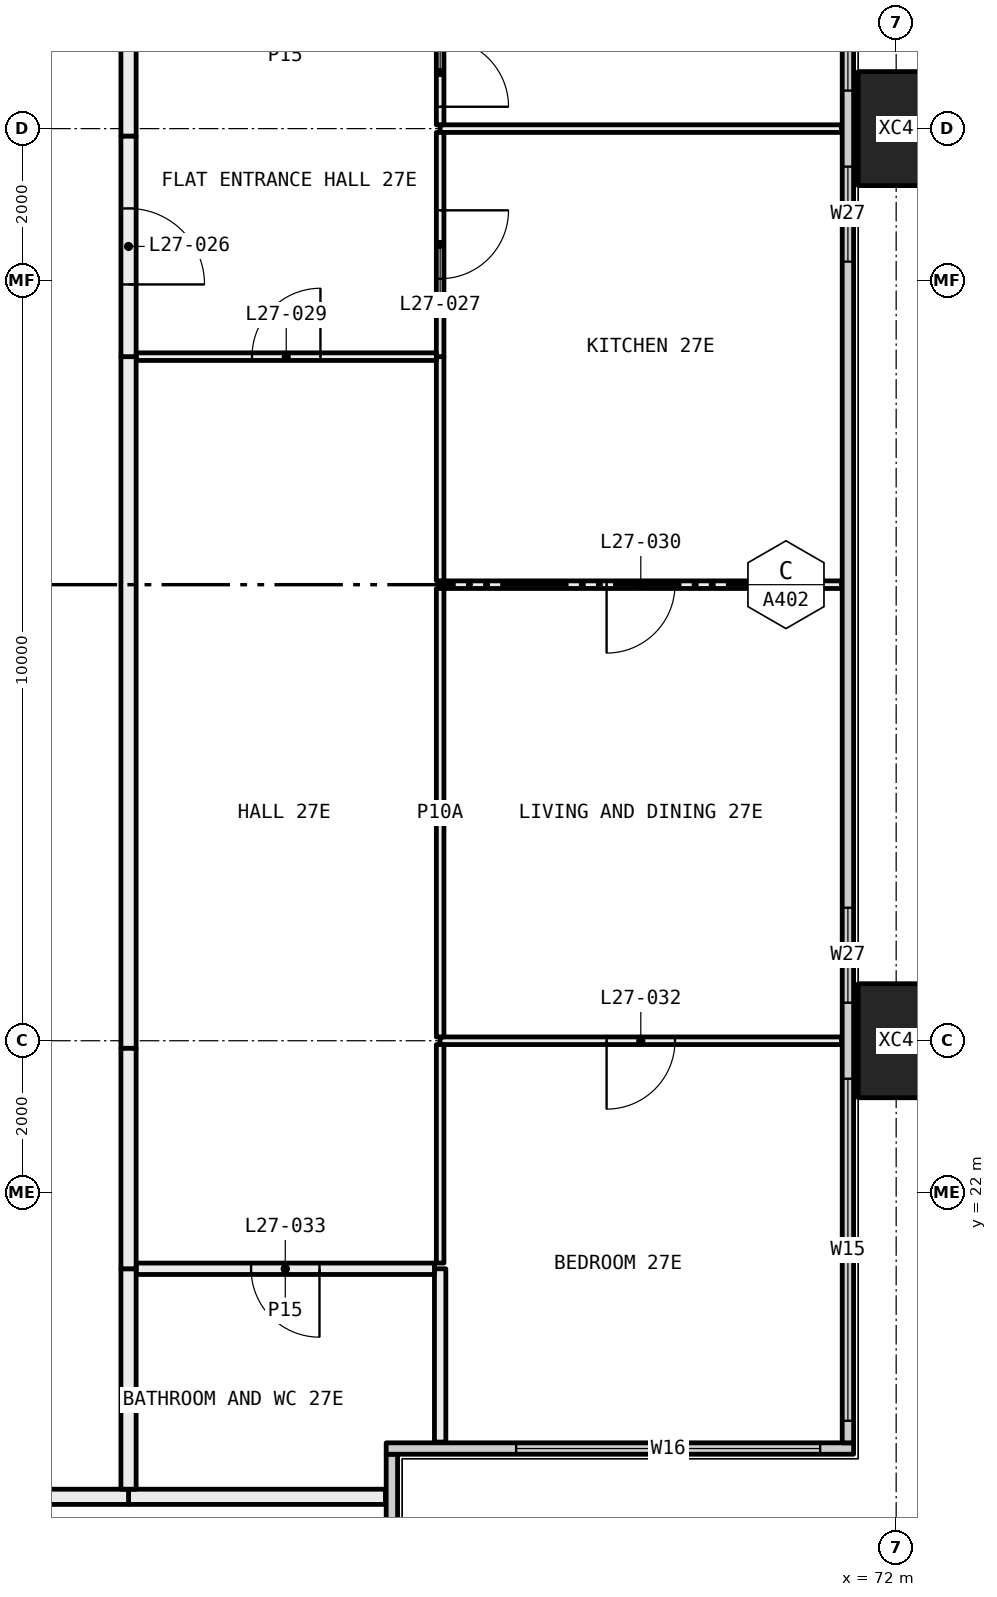
"""IFC4 building model, lengths in metres.
Left out: names, types, materials, properties, quantities, classifications, styles, units other than length and angle.
Written with IfcOpenShell. Run it as: python <this file> out.ifc"""

import sys

from ifc_helpers import new_model, si_unit, direction, frame, frame_2d, origin, origin_2d, place, context, subcontext, project, spatial, rectangle, hollow_rectangle, extrude, element, fill, save


model = new_model("IFC4")
c1 = context("Model", 3, precision=1e-05, world=origin(), true_north=direction((0.0, 1.0)))
c2 = subcontext(c1, "Body", "Model", "MODEL_VIEW")
j1 = project(units=[si_unit("LENGTHUNIT", "METRE"), si_unit("PLANEANGLEUNIT", "RADIAN")], contexts=[c1])
p1 = place(None, origin())
s1 = spatial("IfcSite", under=j1, at=p1, CompositionType="ELEMENT")
p2 = place(p1, origin())
s2 = spatial("IfcBuilding", under=s1, at=p2, CompositionType="ELEMENT")
p3 = place(p2, frame((0.0, 0.0, 106.95)))
s3 = spatial("IfcBuildingStorey", under=s2, at=p3, CompositionType="ELEMENT", Elevation=106.95)
for number, where, z_axis, x_axis in (
    (1, (72.0, 24.0, -0.4), (0.0, 0.0, 1.0), (0.0, 1.0, 0.0)),
    (2, (72.0, 36.0, -0.4), (0.0, 0.0, 1.0), (0.0, 1.0, 0.0)),
):
    element("IfcColumn", number, at=place(p3, frame(where, z_axis=z_axis, x_axis=x_axis)), inside=s3, PredefinedType="COLUMN", context=c2, shape_type="SweptSolid", body=[
        extrude(hollow_rectangle(XDim=1.5, YDim=1.0, WallThickness=0.06, at=origin_2d()), origin(), (0.0, 0.0, 1.0), 3.45),
    ])
p4 = place(p3, frame((65.365, 12.71, 0.0), z_axis=(0.0, 0.0, 1.0), x_axis=(0.0, 1.0, 0.0)))
e3 = element("IfcWall", 3, at=p4, inside=s3, PredefinedType="ELEMENTEDWALL", context=c2, shape_type="SweptSolid", body=[
    extrude(rectangle(XDim=5.85, YDim=0.15, at=frame_2d((2.925, 0.0))), origin(), (0.0, 0.0, 1.0), 3.05),
])
p5 = place(p4, frame((0.29, 0.0, 0.45)))
e4 = element("IfcOpeningElement", 4, at=p5, cuts=e3, PredefinedType="OPENING", context=c2, shape_type="SweptSolid", body=[
    extrude(rectangle(XDim=4.0, YDim=2.55, at=frame_2d((2.0, 1.275))), frame((0.0, 0.085, 0.0), z_axis=(0.0, -1.0, 0.0), x_axis=(1.0, 0.0, 0.0)), (0.0, 0.0, 1.0), 0.17),
])
p6 = place(p3, frame((65.29, 18.635, 0.0), z_axis=(0.0, 0.0, 1.0), x_axis=(1.0, 0.0, 0.0)))
e5 = element("IfcWall", 5, at=p6, inside=s3, PredefinedType="ELEMENTEDWALL", context=c2, shape_type="SweptSolid", body=[
    extrude(rectangle(XDim=6.15, YDim=0.15, at=frame_2d((3.075, 0.0))), origin(), (0.0, 0.0, 1.0), 3.05),
])
p7 = place(p6, frame((1.71, 0.0, 0.45)))
e6 = element("IfcOpeningElement", 6, at=p7, cuts=e5, PredefinedType="OPENING", context=c2, shape_type="SweptSolid", body=[
    extrude(rectangle(XDim=4.0, YDim=2.55, at=frame_2d((2.0, 1.275))), frame((0.0, 0.085, 0.0), z_axis=(0.0, -1.0, 0.0), x_axis=(1.0, 0.0, 0.0)), (0.0, 0.0, 1.0), 0.17),
])
p8 = place(p3, frame((71.365, 18.71, 0.0), z_axis=(0.0, 0.0, 1.0), x_axis=(0.0, 1.0, 0.0)))
e7 = element("IfcWall", 7, at=p8, inside=s3, PredefinedType="ELEMENTEDWALL", context=c2, shape_type="SweptSolid", body=[
    extrude(rectangle(XDim=22.58, YDim=0.15, at=frame_2d((11.29, 0.0))), origin(), (0.0, 0.0, 1.0), 3.05),
])
p9 = place(p8, frame((0.29, 0.0, 0.45)))
e8 = element("IfcOpeningElement", 8, at=p9, cuts=e7, PredefinedType="OPENING", context=c2, shape_type="SweptSolid", body=[
    extrude(rectangle(XDim=4.5, YDim=2.55, at=frame_2d((2.25, 1.275))), frame((0.0, 0.085, 0.0), z_axis=(0.0, -1.0, 0.0), x_axis=(1.0, 0.0, 0.0)), (0.0, 0.0, 1.0), 0.17),
])
p10 = place(p8, frame((5.79, 0.0, 0.45)))
e9 = element("IfcOpeningElement", 9, at=p10, cuts=e7, PredefinedType="OPENING", context=c2, shape_type="SweptSolid", body=[
    extrude(rectangle(XDim=1.25, YDim=2.55, at=frame_2d((0.625, 1.275))), frame((0.0, 0.085, 0.0), z_axis=(0.0, -1.0, 0.0), x_axis=(1.0, 0.0, 0.0)), (0.0, 0.0, 1.0), 0.17),
])
p11 = place(p8, frame((15.54, 0.0, 0.45)))
e10 = element("IfcOpeningElement", 10, at=p11, cuts=e7, PredefinedType="OPENING", context=c2, shape_type="SweptSolid", body=[
    extrude(rectangle(XDim=1.25, YDim=2.55, at=frame_2d((0.625, 1.275))), frame((0.0, 0.085, 0.0), z_axis=(0.0, -1.0, 0.0), x_axis=(1.0, 0.0, 0.0)), (0.0, 0.0, 1.0), 0.17),
])
p12 = place(p8, frame((17.79, 0.0, 0.45)))
e11 = element("IfcOpeningElement", 11, at=p12, cuts=e7, PredefinedType="OPENING", context=c2, shape_type="SweptSolid", body=[
    extrude(rectangle(XDim=4.5, YDim=2.55, at=frame_2d((2.25, 1.275))), frame((0.0, 0.085, 0.0), z_axis=(0.0, -1.0, 0.0), x_axis=(1.0, 0.0, 0.0)), (0.0, 0.0, 1.0), 0.17),
])
p13 = place(p3, frame((65.28, 18.0, 0.0), z_axis=(0.0, 0.0, 1.0), x_axis=(-1.0, 0.0, 0.0)))
e12 = element("IfcWall", 12, at=p13, inside=s3, PredefinedType="PARTITIONING", context=c2, shape_type="SweptSolid", body=[
    extrude(rectangle(XDim=3.38, YDim=0.2, at=frame_2d((1.69, 0.0))), origin(), (0.0, 0.0, 1.0), 3.05),
])
p14 = place(p3, frame((61.9, 18.0, 0.0), z_axis=(0.0, 0.0, 1.0), x_axis=(-1.0, 0.0, 0.0)))
e13 = element("IfcWall", 13, at=p14, inside=s3, PredefinedType="PARTITIONING", context=c2, shape_type="SweptSolid", body=[
    extrude(rectangle(XDim=1.9, YDim=0.2, at=frame_2d((0.95, 0.0))), origin(), (0.0, 0.0, 1.0), 3.05),
])
p15 = place(p3, frame((71.28, 24.0, 0.0), z_axis=(0.0, 0.0, 1.0), x_axis=(-1.0, 0.0, 0.0)))
e14 = element("IfcWall", 14, at=p15, inside=s3, PredefinedType="PARTITIONING", context=c2, shape_type="SweptSolid", body=[
    extrude(rectangle(XDim=5.28, YDim=0.1, at=frame_2d((2.64, 0.0))), origin(), (0.0, 0.0, 1.0), 2.45),
])
p16 = place(p15, frame((2.19, 0.0, 0.0)))
e15 = element("IfcOpeningElement", 15, at=p16, cuts=e14, PredefinedType="OPENING", context=c2, shape_type="SweptSolid", body=[
    extrude(rectangle(XDim=0.9, YDim=2.1, at=frame_2d((0.45, 1.05))), frame((0.0, 0.06, 0.0), z_axis=(0.0, -1.0, 0.0), x_axis=(1.0, 0.0, 0.0)), (0.0, 0.0, 1.0), 0.12),
])
p17 = place(p3, frame((66.0, 21.0, 0.0), z_axis=(0.0, 0.0, 1.0), x_axis=(0.0, -1.0, 0.0)))
e16 = element("IfcWall", 16, at=p17, inside=s3, PredefinedType="PARTITIONING", context=c2, shape_type="SweptSolid", body=[
    extrude(rectangle(XDim=2.28, YDim=0.15, at=frame_2d((1.14, 0.0))), origin(), (0.0, 0.0, 1.0), 3.05),
])
p18 = place(p3, frame((66.0, 23.95, 0.0), z_axis=(0.0, 0.0, 1.0), x_axis=(0.0, -1.0, 0.0)))
e17 = element("IfcWall", 17, at=p18, inside=s3, PredefinedType="PARTITIONING", context=c2, shape_type="SweptSolid", body=[
    extrude(rectangle(XDim=2.875, YDim=0.1, at=frame_2d((1.438, 0.0))), origin(), (0.0, 0.0, 1.0), 2.45),
])
p19 = place(p3, frame((71.28, 30.0, 0.0), z_axis=(0.0, 0.0, 1.0), x_axis=(-1.0, 0.0, 0.0)))
e18 = element("IfcWall", 18, at=p19, inside=s3, PredefinedType="PARTITIONING", context=c2, shape_type="SweptSolid", body=[
    extrude(rectangle(XDim=5.28, YDim=0.1, at=frame_2d((2.64, 0.0))), origin(), (0.0, 0.0, 1.0), 3.05),
])
p20 = place(p19, frame((2.19, 0.0, 0.0)))
e19 = element("IfcOpeningElement", 19, at=p20, cuts=e18, PredefinedType="OPENING", context=c2, shape_type="SweptSolid", body=[
    extrude(rectangle(XDim=0.9, YDim=2.1, at=frame_2d((0.45, 1.05))), frame((0.0, 0.06, 0.0), z_axis=(0.0, -1.0, 0.0), x_axis=(1.0, 0.0, 0.0)), (0.0, 0.0, 1.0), 0.12),
])
p21 = place(p3, frame((66.0, 29.95, 0.0), z_axis=(0.0, 0.0, 1.0), x_axis=(0.0, -1.0, 0.0)))
e20 = element("IfcWall", 20, at=p21, inside=s3, PredefinedType="PARTITIONING", context=c2, shape_type="SweptSolid", body=[
    extrude(rectangle(XDim=5.9, YDim=0.1, at=frame_2d((2.95, 0.0))), origin(), (0.0, 0.0, 1.0), 2.45),
])
p22 = place(p3, frame((71.28, 36.0, 0.0), z_axis=(0.0, 0.0, 1.0), x_axis=(-1.0, 0.0, 0.0)))
e21 = element("IfcWall", 21, at=p22, inside=s3, PredefinedType="PARTITIONING", context=c2, shape_type="SweptSolid", body=[
    extrude(rectangle(XDim=5.28, YDim=0.1, at=frame_2d((2.64, 0.0))), origin(), (0.0, 0.0, 1.0), 2.45),
])
p23 = place(p3, frame((66.0, 33.0, 0.0), z_axis=(0.0, 0.0, 1.0), x_axis=(0.0, -1.0, 0.0)))
e22 = element("IfcWall", 22, at=p23, inside=s3, PredefinedType="PARTITIONING", context=c2, shape_type="SweptSolid", body=[
    extrude(rectangle(XDim=2.95, YDim=0.1, at=frame_2d((1.475, 0.0))), origin(), (0.0, 0.0, 1.0), 3.05),
])
p24 = place(p3, frame((66.0, 35.95, 0.0), z_axis=(0.0, 0.0, 1.0), x_axis=(0.0, -1.0, 0.0)))
e23 = element("IfcWall", 23, at=p24, inside=s3, PredefinedType="PARTITIONING", context=c2, shape_type="SweptSolid", body=[
    extrude(rectangle(XDim=2.95, YDim=0.1, at=frame_2d((1.475, 0.0))), origin(), (0.0, 0.0, 1.0), 2.45),
])
p25 = place(p24, frame((1.025, 0.0, 0.0)))
e24 = element("IfcOpeningElement", 24, at=p25, cuts=e23, PredefinedType="OPENING", context=c2, shape_type="SweptSolid", body=[
    extrude(rectangle(XDim=0.9, YDim=2.1, at=frame_2d((0.45, 1.05))), frame((0.0, 0.06, 0.0), z_axis=(0.0, -1.0, 0.0), x_axis=(1.0, 0.0, 0.0)), (0.0, 0.0, 1.0), 0.12),
])
p26 = place(p3, frame((66.0, 37.425, 0.0), z_axis=(0.0, 0.0, 1.0), x_axis=(0.0, -1.0, 0.0)))
e25 = element("IfcWall", 25, at=p26, inside=s3, PredefinedType="PARTITIONING", context=c2, shape_type="SweptSolid", body=[
    extrude(rectangle(XDim=1.375, YDim=0.1, at=frame_2d((0.688, 0.0))), origin(), (0.0, 0.0, 1.0), 2.45),
])
p27 = place(p26, frame((0.238, 0.0, 0.0)))
e26 = element("IfcOpeningElement", 26, at=p27, cuts=e25, PredefinedType="OPENING", context=c2, shape_type="SweptSolid", body=[
    extrude(rectangle(XDim=0.9, YDim=2.1, at=frame_2d((0.45, 1.05))), frame((0.0, 0.06, 0.0), z_axis=(0.0, -1.0, 0.0), x_axis=(1.0, 0.0, 0.0)), (0.0, 0.0, 1.0), 0.12),
])
p28 = place(p3, frame((65.925, 21.0, 0.0), z_axis=(0.0, 0.0, 1.0), x_axis=(-1.0, 0.0, 0.0)))
e27 = element("IfcWall", 27, at=p28, inside=s3, PredefinedType="PARTITIONING", context=c2, shape_type="SweptSolid", body=[
    extrude(rectangle(XDim=3.925, YDim=0.15, at=frame_2d((1.962, 0.0))), origin(), (0.0, 0.0, 1.0), 3.05),
])
p29 = place(p28, frame((1.512, 0.0, 0.0)))
e28 = element("IfcOpeningElement", 28, at=p29, cuts=e27, PredefinedType="OPENING", context=c2, shape_type="SweptSolid", body=[
    extrude(rectangle(XDim=0.9, YDim=2.1, at=frame_2d((0.45, 1.05))), frame((0.0, 0.085, 0.0), z_axis=(0.0, -1.0, 0.0), x_axis=(1.0, 0.0, 0.0)), (0.0, 0.0, 1.0), 0.17),
])
p30 = place(p3, frame((61.9, 21.0, 0.0), z_axis=(0.0, 0.0, 1.0), x_axis=(0.0, -1.0, 0.0)))
e29 = element("IfcWall", 29, at=p30, inside=s3, PredefinedType="PARTITIONING", context=c2, shape_type="SweptSolid", body=[
    extrude(rectangle(XDim=2.9, YDim=0.2, at=frame_2d((1.45, 0.0))), origin(), (0.0, 0.0, 1.0), 3.05),
])
p31 = place(p3, frame((65.95, 33.0, 0.0), z_axis=(0.0, 0.0, 1.0), x_axis=(-1.0, 0.0, 0.0)))
e30 = element("IfcWall", 30, at=p31, inside=s3, PredefinedType="PARTITIONING", context=c2, shape_type="SweptSolid", body=[
    extrude(rectangle(XDim=3.95, YDim=0.1, at=frame_2d((1.975, 0.0))), origin(), (0.0, 0.0, 1.0), 3.05),
])
p32 = place(p31, frame((1.525, 0.0, 0.0)))
e31 = element("IfcOpeningElement", 31, at=p32, cuts=e30, PredefinedType="OPENING", context=c2, shape_type="SweptSolid", body=[
    extrude(rectangle(XDim=0.9, YDim=2.1, at=frame_2d((0.45, 1.05))), frame((0.0, 0.06, 0.0), z_axis=(0.0, -1.0, 0.0), x_axis=(1.0, 0.0, 0.0)), (0.0, 0.0, 1.0), 0.12),
])
p33 = place(p3, frame((61.9, 33.0, 0.0), z_axis=(0.0, 0.0, 1.0), x_axis=(0.0, -1.0, 0.0)))
e32 = element("IfcWall", 32, at=p33, inside=s3, PredefinedType="PARTITIONING", context=c2, shape_type="SweptSolid", body=[
    extrude(rectangle(XDim=9.1, YDim=0.2, at=frame_2d((4.55, 0.0))), origin(), (0.0, 0.0, 1.0), 2.45),
])
p34 = place(p3, frame((61.9, 23.9, 0.0), z_axis=(0.0, 0.0, 1.0), x_axis=(0.0, -1.0, 0.0)))
e33 = element("IfcWall", 33, at=p34, inside=s3, PredefinedType="PARTITIONING", context=c2, shape_type="SweptSolid", body=[
    extrude(rectangle(XDim=2.9, YDim=0.2, at=frame_2d((1.45, 0.0))), origin(), (0.0, 0.0, 1.0), 3.05),
])
p35 = place(p3, frame((61.9, 37.5, 0.0), z_axis=(0.0, 0.0, 1.0), x_axis=(0.0, -1.0, 0.0)))
e34 = element("IfcWall", 34, at=p35, inside=s3, PredefinedType="PARTITIONING", context=c2, shape_type="SweptSolid", body=[
    extrude(rectangle(XDim=1.6, YDim=0.2, at=frame_2d((0.8, 0.0))), origin(), (0.0, 0.0, 1.0), 2.45),
])
p36 = place(p3, frame((61.9, 35.9, 0.0), z_axis=(0.0, 0.0, 1.0), x_axis=(0.0, -1.0, 0.0)))
e35 = element("IfcWall", 35, at=p36, inside=s3, PredefinedType="PARTITIONING", context=c2, shape_type="SweptSolid", body=[
    extrude(rectangle(XDim=2.9, YDim=0.2, at=frame_2d((1.45, 0.0))), origin(), (0.0, 0.0, 1.0), 3.05),
])
p37 = place(p36, frame((0.95, 0.0, 0.0)))
e36 = element("IfcOpeningElement", 36, at=p37, cuts=e35, PredefinedType="OPENING", context=c2, shape_type="SweptSolid", body=[
    extrude(rectangle(XDim=1.0, YDim=2.1, at=frame_2d((0.5, 1.05))), frame((0.0, 0.11, 0.0), z_axis=(0.0, -1.0, 0.0), x_axis=(1.0, 0.0, 0.0)), (0.0, 0.0, 1.0), 0.22),
])
p38 = place(p7, origin())
e37 = element("IfcWindow", 37, at=p38, inside=s3, PartitioningType="SINGLE_PANEL", PredefinedType="WINDOW", context=c2, shape_type="SweptSolid", body=[
    extrude(rectangle(XDim=4.0, YDim=2.55, at=frame_2d((2.0, 1.275))), frame((0.0, 0.03, 0.0), z_axis=(0.0, -1.0, 0.0), x_axis=(1.0, 0.0, 0.0)), (0.0, 0.0, 1.0), 0.06),
])
fill(e6, e37)
p39 = place(p9, origin())
e38 = element("IfcWindow", 38, at=p39, inside=s3, PartitioningType="SINGLE_PANEL", PredefinedType="WINDOW", context=c2, shape_type="SweptSolid", body=[
    extrude(rectangle(XDim=4.5, YDim=2.55, at=frame_2d((2.25, 1.275))), frame((0.0, 0.03, 0.0), z_axis=(0.0, -1.0, 0.0), x_axis=(1.0, 0.0, 0.0)), (0.0, 0.0, 1.0), 0.06),
])
fill(e8, e38)
p40 = place(p10, origin())
e39 = element("IfcWindow", 39, at=p40, inside=s3, PartitioningType="SINGLE_PANEL", PredefinedType="WINDOW", context=c2, shape_type="SweptSolid", body=[
    extrude(rectangle(XDim=1.25, YDim=2.55, at=frame_2d((0.625, 1.275))), frame((0.0, 0.03, 0.0), z_axis=(0.0, -1.0, 0.0), x_axis=(1.0, 0.0, 0.0)), (0.0, 0.0, 1.0), 0.06),
])
fill(e9, e39)
p41 = place(p11, origin())
e40 = element("IfcWindow", 40, at=p41, inside=s3, PartitioningType="SINGLE_PANEL", PredefinedType="WINDOW", context=c2, shape_type="SweptSolid", body=[
    extrude(rectangle(XDim=1.25, YDim=2.55, at=frame_2d((0.625, 1.275))), frame((0.0, 0.03, 0.0), z_axis=(0.0, -1.0, 0.0), x_axis=(1.0, 0.0, 0.0)), (0.0, 0.0, 1.0), 0.06),
])
fill(e10, e40)
p42 = place(p12, origin())
e41 = element("IfcWindow", 41, at=p42, inside=s3, PartitioningType="SINGLE_PANEL", PredefinedType="WINDOW", context=c2, shape_type="SweptSolid", body=[
    extrude(rectangle(XDim=4.5, YDim=2.55, at=frame_2d((2.25, 1.275))), frame((0.0, 0.03, 0.0), z_axis=(0.0, -1.0, 0.0), x_axis=(1.0, 0.0, 0.0)), (0.0, 0.0, 1.0), 0.06),
])
fill(e11, e41)
p43 = place(p37, origin())
e42 = element("IfcDoor", 42, at=p43, inside=s3, OperationType="SINGLE_SWING_LEFT", PredefinedType="DOOR", context=c2, shape_type="SweptSolid", body=[
    extrude(rectangle(XDim=1.0, YDim=2.1, at=frame_2d((0.5, 1.05))), frame((0.0, 0.025, 0.0), z_axis=(0.0, -1.0, 0.0), x_axis=(1.0, 0.0, 0.0)), (0.0, 0.0, 1.0), 0.05),
])
fill(e36, e42)
p44 = place(p25, origin())
e43 = element("IfcDoor", 43, at=p44, inside=s3, OperationType="SINGLE_SWING_RIGHT", PredefinedType="DOOR", context=c2, shape_type="SweptSolid", body=[
    extrude(rectangle(XDim=0.9, YDim=2.1, at=frame_2d((0.45, 1.05))), frame((0.0, 0.025, 0.0), z_axis=(0.0, -1.0, 0.0), x_axis=(1.0, 0.0, 0.0)), (0.0, 0.0, 1.0), 0.05),
])
fill(e24, e43)
p45 = place(p27, origin())
e44 = element("IfcDoor", 44, at=p45, inside=s3, OperationType="SINGLE_SWING_LEFT", PredefinedType="DOOR", context=c2, shape_type="SweptSolid", body=[
    extrude(rectangle(XDim=0.9, YDim=2.1, at=frame_2d((0.45, 1.05))), frame((0.0, 0.025, 0.0), z_axis=(0.0, -1.0, 0.0), x_axis=(1.0, 0.0, 0.0)), (0.0, 0.0, 1.0), 0.05),
])
fill(e26, e44)
p46 = place(p32, frame((0.9, 0.0, 0.0), x_axis=(-1.0, 0.0, 0.0)))
e45 = element("IfcDoor", 45, at=p46, inside=s3, OperationType="SINGLE_SWING_LEFT", PredefinedType="DOOR", context=c2, shape_type="SweptSolid", body=[
    extrude(rectangle(XDim=0.9, YDim=2.1, at=frame_2d((0.45, 1.05))), frame((0.0, 0.025, 0.0), z_axis=(0.0, -1.0, 0.0), x_axis=(1.0, 0.0, 0.0)), (0.0, 0.0, 1.0), 0.05),
])
fill(e31, e45)
p47 = place(p20, origin())
e46 = element("IfcDoor", 46, at=p47, inside=s3, OperationType="SINGLE_SWING_LEFT", PredefinedType="DOOR", context=c2, shape_type="SweptSolid", body=[
    extrude(rectangle(XDim=0.9, YDim=2.1, at=frame_2d((0.45, 1.05))), frame((0.0, 0.025, 0.0), z_axis=(0.0, -1.0, 0.0), x_axis=(1.0, 0.0, 0.0)), (0.0, 0.0, 1.0), 0.05),
])
fill(e19, e46)
p48 = place(p16, origin())
e47 = element("IfcDoor", 47, at=p48, inside=s3, OperationType="SINGLE_SWING_LEFT", PredefinedType="DOOR", context=c2, shape_type="SweptSolid", body=[
    extrude(rectangle(XDim=0.9, YDim=2.1, at=frame_2d((0.45, 1.05))), frame((0.0, 0.025, 0.0), z_axis=(0.0, -1.0, 0.0), x_axis=(1.0, 0.0, 0.0)), (0.0, 0.0, 1.0), 0.05),
])
fill(e15, e47)
p49 = place(p29, origin())
e48 = element("IfcDoor", 48, at=p49, inside=s3, OperationType="SINGLE_SWING_RIGHT", PredefinedType="DOOR", context=c2, shape_type="SweptSolid", body=[
    extrude(rectangle(XDim=0.9, YDim=2.1, at=frame_2d((0.45, 1.05))), frame((0.0, 0.025, 0.0), z_axis=(0.0, -1.0, 0.0), x_axis=(1.0, 0.0, 0.0)), (0.0, 0.0, 1.0), 0.05),
])
fill(e28, e48)
save(model, sys.argv[1])
